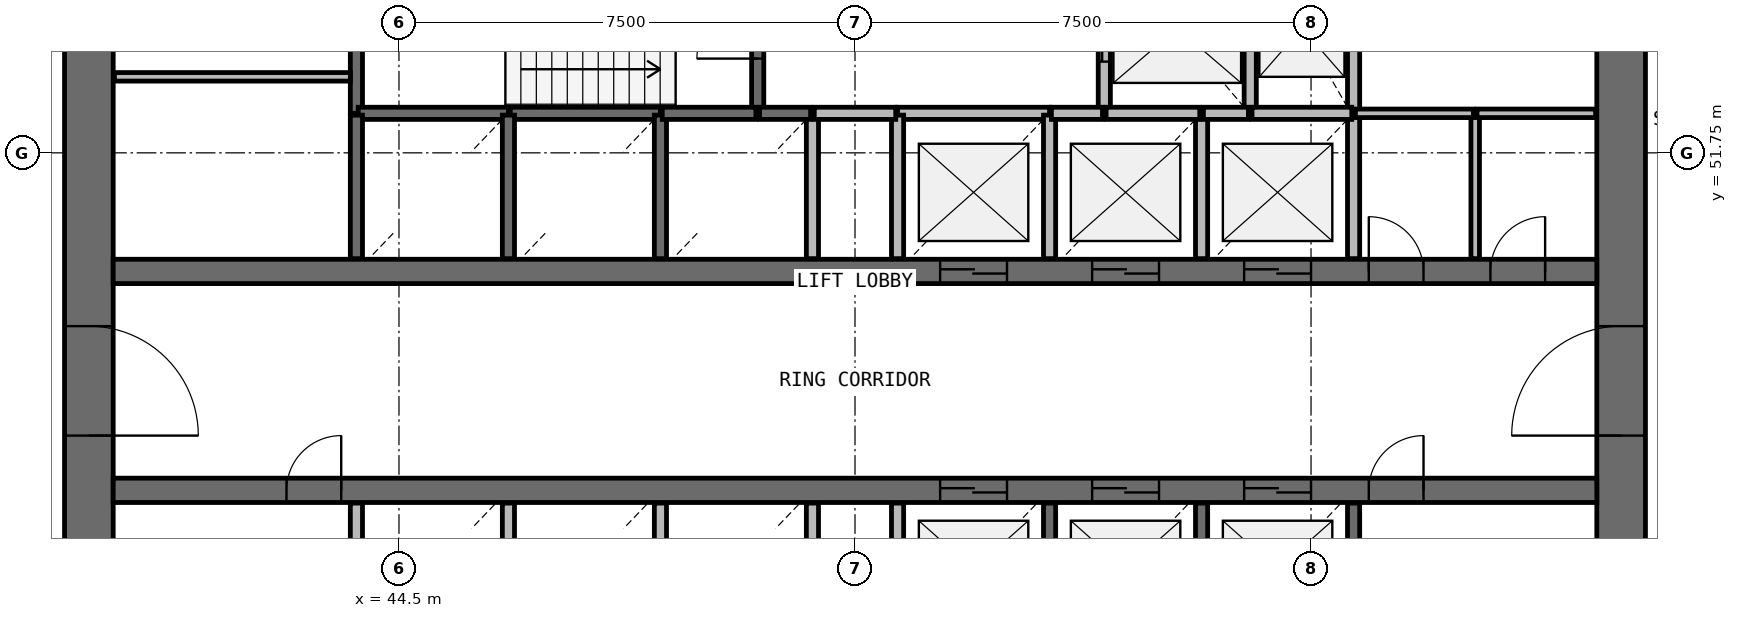
"""IFC4 building model, lengths in metres.
Left out: names, types, materials, properties, quantities, classifications, styles, units other than length and angle.
Written with IfcOpenShell. Run it as: python <this file> out.ifc"""

import sys

from ifc_helpers import new_model, si_unit, direction, frame, frame_2d, origin, place, context, subcontext, project, spatial, rectangle, extrude, source, transform, mapped, element, fill, save


model = new_model("IFC4")
c1 = context("Model", 3, precision=1e-05, world=origin(), true_north=direction((0.0, 1.0)))
c2 = subcontext(c1, "Body", "Model", "MODEL_VIEW")
j1 = project(units=[si_unit("LENGTHUNIT", "METRE"), si_unit("PLANEANGLEUNIT", "RADIAN")], contexts=[c1])
p1 = place(None, origin())
s1 = spatial("IfcSite", under=j1, at=p1, CompositionType="ELEMENT")
p2 = place(p1, origin())
s2 = spatial("IfcBuilding", under=s1, at=p2, CompositionType="ELEMENT")
p3 = place(p2, frame((0.0, 0.0, 137.0)))
s3 = spatial("IfcBuildingStorey", under=s2, at=p3, CompositionType="ELEMENT", Elevation=137.0)
p4 = place(p3, frame((64.6, 38.0, 0.0), z_axis=(0.0, 0.0, 1.0), x_axis=(0.0, 1.0, 0.0)))
e1 = element("IfcWall", 1, at=p4, inside=s3, PredefinedType="SHEAR", context=c2, shape_type="SweptSolid", body=[
    extrude(rectangle(XDim=20.0, YDim=0.8, at=frame_2d((10.0, 0.0))), origin(), (0.0, 0.0, 1.0), 3.9),
])
p5 = place(p4, frame((9.1, 0.0, 0.0)))
e2 = element("IfcOpeningElement", 2, at=p5, cuts=e1, PredefinedType="OPENING", context=c2, shape_type="SweptSolid", body=[
    extrude(rectangle(XDim=1.8, YDim=2.1, at=frame_2d((0.9, 1.05))), frame((0.0, 0.41, 0.0), z_axis=(0.0, -1.0, 0.0), x_axis=(1.0, 0.0, 0.0)), (0.0, 0.0, 1.0), 0.82),
])
p6 = place(p3, frame((39.4, 58.0, 0.0), z_axis=(0.0, 0.0, 1.0), x_axis=(0.0, -1.0, 0.0)))
e3 = element("IfcWall", 3, at=p6, inside=s3, PredefinedType="SHEAR", context=c2, shape_type="SweptSolid", body=[
    extrude(rectangle(XDim=20.0, YDim=0.8, at=frame_2d((10.0, 0.0))), origin(), (0.0, 0.0, 1.0), 3.9),
])
p7 = place(p6, frame((9.1, 0.0, 0.0)))
e4 = element("IfcOpeningElement", 4, at=p7, cuts=e3, PredefinedType="OPENING", context=c2, shape_type="SweptSolid", body=[
    extrude(rectangle(XDim=1.8, YDim=2.1, at=frame_2d((0.9, 1.05))), frame((0.0, 0.41, 0.0), z_axis=(0.0, -1.0, 0.0), x_axis=(1.0, 0.0, 0.0)), (0.0, 0.0, 1.0), 0.82),
])
p8 = place(p3, frame((39.8, 49.8, 0.0), z_axis=(0.0, 0.0, 1.0), x_axis=(1.0, 0.0, 0.0)))
e5 = element("IfcWall", 5, at=p8, inside=s3, PredefinedType="SHEAR", context=c2, shape_type="SweptSolid", body=[
    extrude(rectangle(XDim=24.4, YDim=0.4, at=frame_2d((12.2, 0.0))), origin(), (0.0, 0.0, 1.0), 3.9),
])
p9 = place(p8, frame((13.6, 0.0, 0.0)))
e6 = element("IfcOpeningElement", 6, at=p9, cuts=e5, PredefinedType="OPENING", context=c2, shape_type="SweptSolid", body=[
    extrude(rectangle(XDim=1.1, YDim=2.1, at=frame_2d((0.55, 1.05))), frame((0.0, 0.21, 0.0), z_axis=(0.0, -1.0, 0.0), x_axis=(1.0, 0.0, 0.0)), (0.0, 0.0, 1.0), 0.42),
])
p10 = place(p8, frame((16.1, 0.0, 0.0)))
e7 = element("IfcOpeningElement", 7, at=p10, cuts=e5, PredefinedType="OPENING", context=c2, shape_type="SweptSolid", body=[
    extrude(rectangle(XDim=1.1, YDim=2.1, at=frame_2d((0.55, 1.05))), frame((0.0, 0.21, 0.0), z_axis=(0.0, -1.0, 0.0), x_axis=(1.0, 0.0, 0.0)), (0.0, 0.0, 1.0), 0.42),
])
p11 = place(p8, frame((18.6, 0.0, 0.0)))
e8 = element("IfcOpeningElement", 8, at=p11, cuts=e5, PredefinedType="OPENING", context=c2, shape_type="SweptSolid", body=[
    extrude(rectangle(XDim=1.1, YDim=2.1, at=frame_2d((0.55, 1.05))), frame((0.0, 0.21, 0.0), z_axis=(0.0, -1.0, 0.0), x_axis=(1.0, 0.0, 0.0)), (0.0, 0.0, 1.0), 0.42),
])
p12 = place(p8, frame((20.65, 0.0, 0.0)))
e9 = element("IfcOpeningElement", 9, at=p12, cuts=e5, PredefinedType="OPENING", context=c2, shape_type="SweptSolid", body=[
    extrude(rectangle(XDim=0.9, YDim=2.1, at=frame_2d((0.45, 1.05))), frame((0.0, 0.21, 0.0), z_axis=(0.0, -1.0, 0.0), x_axis=(1.0, 0.0, 0.0)), (0.0, 0.0, 1.0), 0.42),
])
p13 = place(p8, frame((22.65, 0.0, 0.0)))
e10 = element("IfcOpeningElement", 10, at=p13, cuts=e5, PredefinedType="OPENING", context=c2, shape_type="SweptSolid", body=[
    extrude(rectangle(XDim=0.9, YDim=2.1, at=frame_2d((0.45, 1.05))), frame((0.0, 0.21, 0.0), z_axis=(0.0, -1.0, 0.0), x_axis=(1.0, 0.0, 0.0)), (0.0, 0.0, 1.0), 0.42),
])
p14 = place(p3, frame((39.8, 46.2, 0.0), z_axis=(0.0, 0.0, 1.0), x_axis=(1.0, 0.0, 0.0)))
e11 = element("IfcWall", 11, at=p14, inside=s3, PredefinedType="SHEAR", context=c2, shape_type="SweptSolid", body=[
    extrude(rectangle(XDim=24.4, YDim=0.4, at=frame_2d((12.2, 0.0))), origin(), (0.0, 0.0, 1.0), 3.9),
])
p15 = place(p14, frame((13.6, 0.0, 0.0)))
e12 = element("IfcOpeningElement", 12, at=p15, cuts=e11, PredefinedType="OPENING", context=c2, shape_type="SweptSolid", body=[
    extrude(rectangle(XDim=1.1, YDim=2.1, at=frame_2d((0.55, 1.05))), frame((0.0, 0.21, 0.0), z_axis=(0.0, -1.0, 0.0), x_axis=(1.0, 0.0, 0.0)), (0.0, 0.0, 1.0), 0.42),
])
p16 = place(p14, frame((16.1, 0.0, 0.0)))
e13 = element("IfcOpeningElement", 13, at=p16, cuts=e11, PredefinedType="OPENING", context=c2, shape_type="SweptSolid", body=[
    extrude(rectangle(XDim=1.1, YDim=2.1, at=frame_2d((0.55, 1.05))), frame((0.0, 0.21, 0.0), z_axis=(0.0, -1.0, 0.0), x_axis=(1.0, 0.0, 0.0)), (0.0, 0.0, 1.0), 0.42),
])
p17 = place(p14, frame((18.6, 0.0, 0.0)))
e14 = element("IfcOpeningElement", 14, at=p17, cuts=e11, PredefinedType="OPENING", context=c2, shape_type="SweptSolid", body=[
    extrude(rectangle(XDim=1.1, YDim=2.1, at=frame_2d((0.55, 1.05))), frame((0.0, 0.21, 0.0), z_axis=(0.0, -1.0, 0.0), x_axis=(1.0, 0.0, 0.0)), (0.0, 0.0, 1.0), 0.42),
])
p18 = place(p14, frame((20.65, 0.0, 0.0)))
e15 = element("IfcOpeningElement", 15, at=p18, cuts=e11, PredefinedType="OPENING", context=c2, shape_type="SweptSolid", body=[
    extrude(rectangle(XDim=0.9, YDim=2.1, at=frame_2d((0.45, 1.05))), frame((0.0, 0.21, 0.0), z_axis=(0.0, -1.0, 0.0), x_axis=(1.0, 0.0, 0.0)), (0.0, 0.0, 1.0), 0.42),
])
p19 = place(p14, frame((2.85, 0.0, 0.0)))
e16 = element("IfcOpeningElement", 16, at=p19, cuts=e11, PredefinedType="OPENING", context=c2, shape_type="SweptSolid", body=[
    extrude(rectangle(XDim=0.9, YDim=2.1, at=frame_2d((0.45, 1.05))), frame((0.0, 0.21, 0.0), z_axis=(0.0, -1.0, 0.0), x_axis=(1.0, 0.0, 0.0)), (0.0, 0.0, 1.0), 0.42),
])
p20 = place(p3, frame((43.8, 55.17, 0.0), z_axis=(0.0, 0.0, 1.0), x_axis=(0.0, -1.0, 0.0)))
e17 = element("IfcWall", 17, at=p20, inside=s3, PredefinedType="SOLIDWALL", context=c2, shape_type="SweptSolid", body=[
    extrude(rectangle(XDim=2.77, YDim=0.2, at=frame_2d((1.385, 0.0))), origin(), (0.0, 0.0, 1.0), 3.58),
])
p21 = place(p3, frame((50.4, 52.4, 0.0), z_axis=(0.0, 0.0, 1.0), x_axis=(0.0, 1.0, 0.0)))
e18 = element("IfcWall", 18, at=p21, inside=s3, PredefinedType="SOLIDWALL", context=c2, shape_type="SweptSolid", body=[
    extrude(rectangle(XDim=2.77, YDim=0.2, at=frame_2d((1.385, 0.0))), origin(), (0.0, 0.0, 1.0), 3.58),
])
p22 = place(p21, frame((0.9, 0.0, 0.0)))
e19 = element("IfcOpeningElement", 19, at=p22, cuts=e18, PredefinedType="OPENING", context=c2, shape_type="SweptSolid", body=[
    extrude(rectangle(XDim=1.0, YDim=2.1, at=frame_2d((0.5, 1.05))), frame((0.0, 0.11, 0.0), z_axis=(0.0, -1.0, 0.0), x_axis=(1.0, 0.0, 0.0)), (0.0, 0.0, 1.0), 0.22),
])
p23 = place(p3, frame((56.1, 55.17, 0.0), z_axis=(0.0, 0.0, 1.0), x_axis=(0.0, -1.0, 0.0)))
e20 = element("IfcWall", 20, at=p23, inside=s3, PredefinedType="SOLIDWALL", context=c2, shape_type="SweptSolid", body=[
    extrude(rectangle(XDim=2.77, YDim=0.2, at=frame_2d((1.385, 0.0))), origin(), (0.0, 0.0, 1.0), 3.58),
])
p24 = place(p23, frame((0.82, 0.0, 0.0)))
e21 = element("IfcOpeningElement", 21, at=p24, cuts=e20, PredefinedType="OPENING", context=c2, shape_type="SweptSolid", body=[
    extrude(rectangle(XDim=1.1, YDim=2.1, at=frame_2d((0.55, 1.05))), frame((0.0, 0.11, 0.0), z_axis=(0.0, -1.0, 0.0), x_axis=(1.0, 0.0, 0.0)), (0.0, 0.0, 1.0), 0.22),
])
for number, where, z_axis, x_axis in (
    (22, (58.5, 52.4, 0.0), (0.0, 0.0, 1.0), (0.0, 1.0, 0.0)),
    (23, (60.2, 52.4, 0.0), (0.0, 0.0, 1.0), (0.0, 1.0, 0.0)),
):
    element("IfcWall", number, at=place(p3, frame(where, z_axis=z_axis, x_axis=x_axis)), inside=s3, PredefinedType="SOLIDWALL", context=c2, shape_type="SweptSolid", body=[
        extrude(rectangle(XDim=2.8, YDim=0.2, at=frame_2d((1.4, 0.0))), origin(), (0.0, 0.0, 1.0), 3.58),
    ])
for number, where, z_axis, x_axis in (
    (24, (46.3, 52.4, 0.0), (0.0, 0.0, 1.0), (-1.0, 0.0, 0.0)),
    (25, (48.8, 52.4, 0.0), (0.0, 0.0, 1.0), (-1.0, 0.0, 0.0)),
):
    element("IfcWall", number, at=place(p3, frame(where, z_axis=z_axis, x_axis=x_axis)), inside=s3, PredefinedType="SOLIDWALL", context=c2, shape_type="SweptSolid", body=[
        extrude(rectangle(XDim=2.47, YDim=0.2, at=frame_2d((1.235, 0.0))), origin(), (0.0, 0.0, 1.0), 3.58),
    ])
p25 = place(p3, frame((55.2, 52.4, 0.0), z_axis=(0.0, 0.0, 1.0), x_axis=(-1.0, 0.0, 0.0)))
e26 = element("IfcWall", 26, at=p25, inside=s3, PredefinedType="SOLIDWALL", context=c2, shape_type="SweptSolid", body=[
    extrude(rectangle(XDim=2.5, YDim=0.2, at=frame_2d((1.25, 0.0))), origin(), (0.0, 0.0, 1.0), 3.58),
])
for number, where, z_axis, x_axis in (
    (27, (43.8, 45.99, 0.0), (0.0, 0.0, 1.0), (0.0, -1.0, 0.0)),
    (28, (43.8, 52.37, 0.0), (0.0, 0.0, 1.0), (0.0, -1.0, 0.0)),
):
    element("IfcWall", number, at=place(p3, frame(where, z_axis=z_axis, x_axis=x_axis)), inside=s3, PredefinedType="SOLIDWALL", context=c2, shape_type="SweptSolid", body=[
        extrude(rectangle(XDim=2.36, YDim=0.2, at=frame_2d((1.18, 0.0))), origin(), (0.0, 0.0, 1.0), 3.58),
    ])
p26 = place(p3, frame((46.3, 43.6, 0.0), z_axis=(0.0, 0.0, 1.0), x_axis=(0.0, 1.0, 0.0)))
e29 = element("IfcWall", 29, at=p26, inside=s3, PredefinedType="SOLIDWALL", context=c2, shape_type="SweptSolid", body=[
    extrude(rectangle(XDim=2.39, YDim=0.2, at=frame_2d((1.195, 0.0))), origin(), (0.0, 0.0, 1.0), 3.58),
])
for number, where, z_axis, x_axis in (
    (30, (46.3, 50.01, 0.0), (0.0, 0.0, 1.0), (0.0, 1.0, 0.0)),
    (31, (48.8, 43.63, 0.0), (0.0, 0.0, 1.0), (0.0, 1.0, 0.0)),
    (32, (48.8, 50.01, 0.0), (0.0, 0.0, 1.0), (0.0, 1.0, 0.0)),
    (33, (51.3, 43.63, 0.0), (0.0, 0.0, 1.0), (0.0, 1.0, 0.0)),
):
    element("IfcWall", number, at=place(p3, frame(where, z_axis=z_axis, x_axis=x_axis)), inside=s3, PredefinedType="SOLIDWALL", context=c2, shape_type="SweptSolid", body=[
        extrude(rectangle(XDim=2.36, YDim=0.2, at=frame_2d((1.18, 0.0))), origin(), (0.0, 0.0, 1.0), 3.58),
    ])
for number, where, z_axis, x_axis in (
    (34, (51.3, 50.01, 0.0), (0.0, 0.0, 1.0), (0.0, 1.0, 0.0)),
    (35, (52.7, 45.99, 0.0), (0.0, 0.0, 1.0), (0.0, -1.0, 0.0)),
):
    element("IfcWall", number, at=place(p3, frame(where, z_axis=z_axis, x_axis=x_axis)), inside=s3, PredefinedType="SOLIDWALL", context=c2, shape_type="SweptSolid", body=[
        extrude(rectangle(XDim=2.39, YDim=0.2, at=frame_2d((1.195, 0.0))), origin(), (0.0, 0.0, 1.0), 3.58),
    ])
for number, where, z_axis, x_axis in (
    (36, (52.7, 52.37, 0.0), (0.0, 0.0, 1.0), (0.0, -1.0, 0.0)),
    (37, (55.2, 43.63, 0.0), (0.0, 0.0, 1.0), (0.0, 1.0, 0.0)),
    (38, (55.2, 50.01, 0.0), (0.0, 0.0, 1.0), (0.0, 1.0, 0.0)),
    (39, (57.7, 43.63, 0.0), (0.0, 0.0, 1.0), (0.0, 1.0, 0.0)),
):
    element("IfcWall", number, at=place(p3, frame(where, z_axis=z_axis, x_axis=x_axis)), inside=s3, PredefinedType="SOLIDWALL", context=c2, shape_type="SweptSolid", body=[
        extrude(rectangle(XDim=2.36, YDim=0.2, at=frame_2d((1.18, 0.0))), origin(), (0.0, 0.0, 1.0), 3.58),
    ])
p27 = place(p3, frame((57.7, 50.01, 0.0), z_axis=(0.0, 0.0, 1.0), x_axis=(0.0, 1.0, 0.0)))
e40 = element("IfcWall", 40, at=p27, inside=s3, PredefinedType="SOLIDWALL", context=c2, shape_type="SweptSolid", body=[
    extrude(rectangle(XDim=2.39, YDim=0.2, at=frame_2d((1.195, 0.0))), origin(), (0.0, 0.0, 1.0), 3.58),
])
for number, where, z_axis, x_axis in (
    (41, (60.2, 43.63, 0.0), (0.0, 0.0, 1.0), (0.0, 1.0, 0.0)),
    (42, (60.2, 50.01, 0.0), (0.0, 0.0, 1.0), (0.0, 1.0, 0.0)),
):
    element("IfcWall", number, at=place(p3, frame(where, z_axis=z_axis, x_axis=x_axis)), inside=s3, PredefinedType="SOLIDWALL", context=c2, shape_type="SweptSolid", body=[
        extrude(rectangle(XDim=2.36, YDim=0.2, at=frame_2d((1.18, 0.0))), origin(), (0.0, 0.0, 1.0), 3.58),
    ])
p28 = place(p3, frame((60.17, 52.4, 0.0), z_axis=(0.0, 0.0, 1.0), x_axis=(-1.0, 0.0, 0.0)))
e43 = element("IfcWall", 43, at=p28, inside=s3, PredefinedType="SOLIDWALL", context=c2, shape_type="SweptSolid", body=[
    extrude(rectangle(XDim=1.64, YDim=0.2, at=frame_2d((0.82, 0.0))), origin(), (0.0, 0.0, 1.0), 3.58),
])
for number, where, z_axis, x_axis in (
    (44, (50.37, 52.4, 0.0), (0.0, 0.0, 1.0), (-1.0, 0.0, 0.0)),
    (45, (57.67, 52.4, 0.0), (0.0, 0.0, 1.0), (-1.0, 0.0, 0.0)),
):
    element("IfcWall", number, at=place(p3, frame(where, z_axis=z_axis, x_axis=x_axis)), inside=s3, PredefinedType="SOLIDWALL", context=c2, shape_type="SweptSolid", body=[
        extrude(rectangle(XDim=1.54, YDim=0.2, at=frame_2d((0.77, 0.0))), origin(), (0.0, 0.0, 1.0), 3.58),
    ])
p29 = place(p3, frame((51.33, 52.4, 0.0), z_axis=(0.0, 0.0, 1.0), x_axis=(1.0, 0.0, 0.0)))
e46 = element("IfcWall", 46, at=p29, inside=s3, PredefinedType="SOLIDWALL", context=c2, shape_type="SweptSolid", body=[
    extrude(rectangle(XDim=1.34, YDim=0.2, at=frame_2d((0.67, 0.0))), origin(), (0.0, 0.0, 1.0), 3.58),
])
for number, where, z_axis, x_axis in (
    (47, (51.27, 52.4, 0.0), (0.0, 0.0, 1.0), (-1.0, 0.0, 0.0)),
    (48, (56.07, 52.4, 0.0), (0.0, 0.0, 1.0), (-1.0, 0.0, 0.0)),
):
    element("IfcWall", number, at=place(p3, frame(where, z_axis=z_axis, x_axis=x_axis)), inside=s3, PredefinedType="SOLIDWALL", context=c2, shape_type="SweptSolid", body=[
        extrude(rectangle(XDim=0.84, YDim=0.2, at=frame_2d((0.42, 0.0))), origin(), (0.0, 0.0, 1.0), 3.58),
    ])
p30 = place(p3, frame((58.47, 52.4, 0.0), z_axis=(0.0, 0.0, 1.0), x_axis=(-1.0, 0.0, 0.0)))
e49 = element("IfcWall", 49, at=p30, inside=s3, PredefinedType="SOLIDWALL", context=c2, shape_type="SweptSolid", body=[
    extrude(rectangle(XDim=0.74, YDim=0.2, at=frame_2d((0.37, 0.0))), origin(), (0.0, 0.0, 1.0), 3.58),
])
p31 = place(p3, frame((39.82, 53.0, 0.0), z_axis=(0.0, 0.0, 1.0), x_axis=(1.0, 0.0, 0.0)))
e50 = element("IfcWall", 50, at=p31, inside=s3, PredefinedType="PARTITIONING", context=c2, shape_type="SweptSolid", body=[
    extrude(rectangle(XDim=3.88, YDim=0.14, at=frame_2d((1.94, 0.0))), origin(), (0.0, 0.0, 1.0), 2.88),
])
p32 = place(p3, frame((62.2, 50.01, 0.0), z_axis=(0.0, 0.0, 1.0), x_axis=(0.0, 1.0, 0.0)))
e51 = element("IfcWall", 51, at=p32, inside=s3, PredefinedType="PARTITIONING", context=c2, shape_type="SweptSolid", body=[
    extrude(rectangle(XDim=2.39, YDim=0.14, at=frame_2d((1.195, 0.0))), origin(), (0.0, 0.0, 1.0), 2.88),
])
p33 = place(p3, frame((62.17, 52.4, 0.0), z_axis=(0.0, 0.0, 1.0), x_axis=(-1.0, 0.0, 0.0)))
e52 = element("IfcWall", 52, at=p33, inside=s3, PredefinedType="PARTITIONING", context=c2, shape_type="SweptSolid", body=[
    extrude(rectangle(XDim=1.94, YDim=0.14, at=frame_2d((0.97, 0.0))), origin(), (0.0, 0.0, 1.0), 2.88),
])
p34 = place(p3, frame((64.18, 52.4, 0.0), z_axis=(0.0, 0.0, 1.0), x_axis=(-1.0, 0.0, 0.0)))
e53 = element("IfcWall", 53, at=p34, inside=s3, PredefinedType="PARTITIONING", context=c2, shape_type="SweptSolid", body=[
    extrude(rectangle(XDim=1.95, YDim=0.14, at=frame_2d((0.975, 0.0))), origin(), (0.0, 0.0, 1.0), 2.88),
])
m1 = source(origin(), c2, "Body", "SweptSolid", [
    extrude(rectangle(XDim=1.8, YDim=2.1, at=frame_2d((0.9, 1.05))), frame((0.0, 0.025, 0.0), z_axis=(0.0, -1.0, 0.0), x_axis=(1.0, 0.0, 0.0)), (0.0, 0.0, 1.0), 0.05),
])
p35 = place(p7, origin())
e54 = element("IfcDoor", 54, at=p35, inside=s3, OperationType="SINGLE_SWING_RIGHT", PredefinedType="DOOR", context=c2, shape_type="MappedRepresentation", body=[
    mapped(m1, transform((0.0, 0.0, 0.0), scale=1.0)),
])
fill(e4, e54)
p36 = place(p5, origin())
e55 = element("IfcDoor", 55, at=p36, inside=s3, OperationType="SINGLE_SWING_LEFT", PredefinedType="DOOR", context=c2, shape_type="MappedRepresentation", body=[
    mapped(m1, transform((0.0, 0.0, 0.0), scale=1.0)),
])
fill(e2, e55)
m2 = source(origin(), c2, "Body", "SweptSolid", [
    extrude(rectangle(XDim=1.1, YDim=2.1, at=frame_2d((0.55, 1.05))), frame((0.0, 0.025, 0.0), z_axis=(0.0, -1.0, 0.0), x_axis=(1.0, 0.0, 0.0)), (0.0, 0.0, 1.0), 0.05),
])
p37 = place(p9, origin())
e56 = element("IfcDoor", 56, at=p37, inside=s3, OperationType="DOUBLE_DOOR_SLIDING", PredefinedType="USERDEFINED", context=c2, shape_type="MappedRepresentation", body=[
    mapped(m2, transform((0.0, 0.0, 0.0), scale=1.0)),
])
fill(e6, e56)
p38 = place(p10, origin())
e57 = element("IfcDoor", 57, at=p38, inside=s3, OperationType="DOUBLE_DOOR_SLIDING", PredefinedType="USERDEFINED", context=c2, shape_type="MappedRepresentation", body=[
    mapped(m2, transform((0.0, 0.0, 0.0), scale=1.0)),
])
fill(e7, e57)
p39 = place(p11, origin())
e58 = element("IfcDoor", 58, at=p39, inside=s3, OperationType="DOUBLE_DOOR_SLIDING", PredefinedType="USERDEFINED", context=c2, shape_type="MappedRepresentation", body=[
    mapped(m2, transform((0.0, 0.0, 0.0), scale=1.0)),
])
fill(e8, e58)
p40 = place(p15, origin())
e59 = element("IfcDoor", 59, at=p40, inside=s3, OperationType="DOUBLE_DOOR_SLIDING", PredefinedType="USERDEFINED", context=c2, shape_type="MappedRepresentation", body=[
    mapped(m2, transform((0.0, 0.0, 0.0), scale=1.0)),
])
fill(e12, e59)
p41 = place(p16, origin())
e60 = element("IfcDoor", 60, at=p41, inside=s3, OperationType="DOUBLE_DOOR_SLIDING", PredefinedType="USERDEFINED", context=c2, shape_type="MappedRepresentation", body=[
    mapped(m2, transform((0.0, 0.0, 0.0), scale=1.0)),
])
fill(e13, e60)
p42 = place(p17, origin())
e61 = element("IfcDoor", 61, at=p42, inside=s3, OperationType="DOUBLE_DOOR_SLIDING", PredefinedType="USERDEFINED", context=c2, shape_type="MappedRepresentation", body=[
    mapped(m2, transform((0.0, 0.0, 0.0), scale=1.0)),
])
fill(e14, e61)
p43 = place(p24, origin())
e62 = element("IfcDoor", 62, at=p43, inside=s3, OperationType="DOUBLE_DOOR_SLIDING", PredefinedType="USERDEFINED", context=c2, shape_type="MappedRepresentation", body=[
    mapped(m2, transform((0.0, 0.0, 0.0), scale=1.0)),
])
fill(e21, e62)
m3 = source(origin(), c2, "Body", "SweptSolid", [
    extrude(rectangle(XDim=1.0, YDim=2.1, at=frame_2d((0.5, 1.05))), frame((0.0, 0.025, 0.0), z_axis=(0.0, -1.0, 0.0), x_axis=(1.0, 0.0, 0.0)), (0.0, 0.0, 1.0), 0.05),
])
p44 = place(p22, origin())
e63 = element("IfcDoor", 63, at=p44, inside=s3, OperationType="SINGLE_SWING_LEFT", PredefinedType="DOOR", context=c2, shape_type="MappedRepresentation", body=[
    mapped(m3, transform((0.0, 0.0, 0.0), scale=1.0)),
])
fill(e19, e63)
m4 = source(origin(), c2, "Body", "SweptSolid", [
    extrude(rectangle(XDim=0.9, YDim=2.1, at=frame_2d((0.45, 1.05))), frame((0.0, 0.025, 0.0), z_axis=(0.0, -1.0, 0.0), x_axis=(1.0, 0.0, 0.0)), (0.0, 0.0, 1.0), 0.05),
])
p45 = place(p18, origin())
e64 = element("IfcDoor", 64, at=p45, inside=s3, OperationType="SINGLE_SWING_RIGHT", PredefinedType="DOOR", context=c2, shape_type="MappedRepresentation", body=[
    mapped(m4, transform((0.0, 0.0, 0.0), scale=1.0)),
])
fill(e15, e64)
p46 = place(p12, origin())
e65 = element("IfcDoor", 65, at=p46, inside=s3, OperationType="SINGLE_SWING_LEFT", PredefinedType="DOOR", context=c2, shape_type="MappedRepresentation", body=[
    mapped(m4, transform((0.0, 0.0, 0.0), scale=1.0)),
])
fill(e9, e65)
p47 = place(p13, origin())
e66 = element("IfcDoor", 66, at=p47, inside=s3, OperationType="SINGLE_SWING_RIGHT", PredefinedType="DOOR", context=c2, shape_type="MappedRepresentation", body=[
    mapped(m4, transform((0.0, 0.0, 0.0), scale=1.0)),
])
fill(e10, e66)
p48 = place(p19, origin())
e67 = element("IfcDoor", 67, at=p48, inside=s3, OperationType="SINGLE_SWING_RIGHT", PredefinedType="DOOR", context=c2, shape_type="MappedRepresentation", body=[
    mapped(m4, transform((0.0, 0.0, 0.0), scale=1.0)),
])
fill(e16, e67)
save(model, sys.argv[1])
